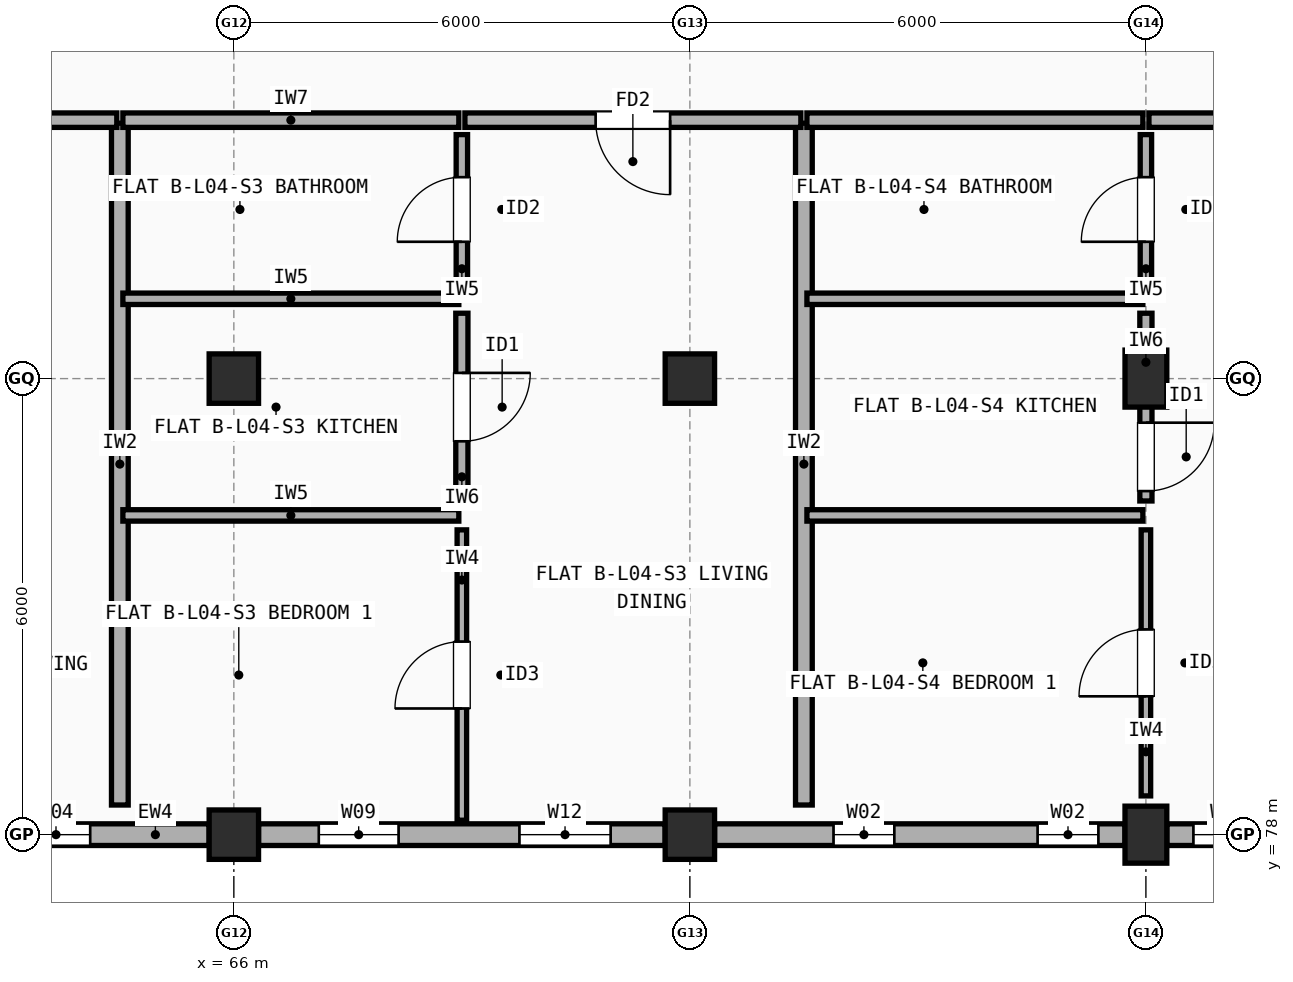
"""IFC4 building model, lengths in metres.
Left out: names, types, materials, properties, quantities, classifications, styles, units other than length and angle.
Written with IfcOpenShell. Run it as: python <this file> out.ifc"""

import sys

from ifc_helpers import new_model, si_unit, direction, frame, frame_2d, origin, origin_2d, place, context, subcontext, project, spatial, rectangle, extrude, element, fill, save


model = new_model("IFC4")
c1 = context("Model", 3, precision=1e-05, world=origin(), true_north=direction((0.0, 1.0)))
c2 = subcontext(c1, "Body", "Model", "MODEL_VIEW")
j1 = project(units=[si_unit("LENGTHUNIT", "METRE"), si_unit("PLANEANGLEUNIT", "RADIAN")], contexts=[c1])
p1 = place(None, origin())
s1 = spatial("IfcSite", under=j1, at=p1, CompositionType="ELEMENT")
p2 = place(p1, origin())
s2 = spatial("IfcBuilding", under=s1, at=p2, CompositionType="ELEMENT")
p3 = place(p2, frame((0.0, 0.0, 14.1)))
s3 = spatial("IfcBuildingStorey", under=s2, at=p3, CompositionType="ELEMENT", Elevation=14.1)
for number, where, z_axis, x_axis in (
    (1, (66.0, 78.0, 0.0), (0.0, 0.0, 1.0), (1.0, 0.0, 0.0)),
    (2, (66.0, 84.0, 0.0), (0.0, 0.0, 1.0), (1.0, 0.0, 0.0)),
    (3, (72.0, 78.0, 0.0), (0.0, 0.0, 1.0), (1.0, 0.0, 0.0)),
    (4, (72.0, 84.0, 0.0), (0.0, 0.0, 1.0), (1.0, 0.0, 0.0)),
):
    element("IfcColumn", number, at=place(p3, frame(where, z_axis=z_axis, x_axis=x_axis)), inside=s3, PredefinedType="COLUMN", context=c2, shape_type="SweptSolid", body=[
        extrude(rectangle(XDim=0.65, YDim=0.65, at=origin_2d()), origin(), (0.0, 0.0, 1.0), 2.95),
    ])
for number, where, z_axis, x_axis in (
    (5, (78.0, 78.0, 0.0), (0.0, 0.0, 1.0), (1.0, 0.0, 0.0)),
    (6, (78.0, 84.0, 0.0), (0.0, 0.0, 1.0), (1.0, 0.0, 0.0)),
):
    element("IfcColumn", number, at=place(p3, frame(where, z_axis=z_axis, x_axis=x_axis)), inside=s3, PredefinedType="COLUMN", context=c2, shape_type="SweptSolid", body=[
        extrude(rectangle(XDim=0.55, YDim=0.75, at=origin_2d()), origin(), (0.0, 0.0, 1.0), 2.95),
    ])
p4 = place(p3, frame((60.325, 78.0, 0.0), z_axis=(0.0, 0.0, 1.0), x_axis=(1.0, 0.0, 0.0)))
e7 = element("IfcWall", 7, at=p4, inside=s3, PredefinedType="STANDARD", context=c2, shape_type="SweptSolid", body=[
    extrude(rectangle(XDim=5.35, YDim=0.285, at=frame_2d((2.675, 0.0))), origin(), (0.0, 0.0, 1.0), 2.432),
])
p5 = place(p4, frame((0.35, 0.0, 0.9)))
e8 = element("IfcOpeningElement", 8, at=p5, cuts=e7, PredefinedType="OPENING", context=c2, shape_type="SweptSolid", body=[
    extrude(rectangle(XDim=0.9, YDim=1.3, at=frame_2d((0.45, 0.65))), frame((0.0, 0.152, 0.0), z_axis=(0.0, -1.0, 0.0), x_axis=(1.0, 0.0, 0.0)), (0.0, 0.0, 1.0), 0.305),
])
p6 = place(p4, frame((2.885, 0.0, 0.9)))
e9 = element("IfcOpeningElement", 9, at=p6, cuts=e7, PredefinedType="OPENING", context=c2, shape_type="SweptSolid", body=[
    extrude(rectangle(XDim=0.9, YDim=1.3, at=frame_2d((0.45, 0.65))), frame((0.0, 0.152, 0.0), z_axis=(0.0, -1.0, 0.0), x_axis=(1.0, 0.0, 0.0)), (0.0, 0.0, 1.0), 0.305),
])
p7 = place(p3, frame((66.325, 78.0, 0.0), z_axis=(0.0, 0.0, 1.0), x_axis=(1.0, 0.0, 0.0)))
e10 = element("IfcWall", 10, at=p7, inside=s3, PredefinedType="STANDARD", context=c2, shape_type="SweptSolid", body=[
    extrude(rectangle(XDim=5.35, YDim=0.285, at=frame_2d((2.675, 0.0))), origin(), (0.0, 0.0, 1.0), 2.432),
])
p8 = place(p7, frame((0.792, 0.0, 0.9)))
e11 = element("IfcOpeningElement", 11, at=p8, cuts=e10, PredefinedType="OPENING", context=c2, shape_type="SweptSolid", body=[
    extrude(rectangle(XDim=1.05, YDim=1.35, at=frame_2d((0.525, 0.675))), frame((0.0, 0.152, 0.0), z_axis=(0.0, -1.0, 0.0), x_axis=(1.0, 0.0, 0.0)), (0.0, 0.0, 1.0), 0.305),
])
p9 = place(p7, frame((3.433, 0.0, 0.9)))
e12 = element("IfcOpeningElement", 12, at=p9, cuts=e10, PredefinedType="OPENING", context=c2, shape_type="SweptSolid", body=[
    extrude(rectangle(XDim=1.2, YDim=1.35, at=frame_2d((0.6, 0.675))), frame((0.0, 0.152, 0.0), z_axis=(0.0, -1.0, 0.0), x_axis=(1.0, 0.0, 0.0)), (0.0, 0.0, 1.0), 0.305),
])
p10 = place(p3, frame((72.325, 78.0, 0.0), z_axis=(0.0, 0.0, 1.0), x_axis=(1.0, 0.0, 0.0)))
e13 = element("IfcWall", 13, at=p10, inside=s3, PredefinedType="STANDARD", context=c2, shape_type="SweptSolid", body=[
    extrude(rectangle(XDim=5.4, YDim=0.285, at=frame_2d((2.7, 0.0))), origin(), (0.0, 0.0, 1.0), 2.432),
])
p11 = place(p10, frame((1.565, 0.0, 0.9)))
e14 = element("IfcOpeningElement", 14, at=p11, cuts=e13, PredefinedType="OPENING", context=c2, shape_type="SweptSolid", body=[
    extrude(rectangle(XDim=0.8, YDim=1.2, at=frame_2d((0.4, 0.6))), frame((0.0, 0.152, 0.0), z_axis=(0.0, -1.0, 0.0), x_axis=(1.0, 0.0, 0.0)), (0.0, 0.0, 1.0), 0.305),
])
p12 = place(p10, frame((4.25, 0.0, 0.9)))
e15 = element("IfcOpeningElement", 15, at=p12, cuts=e13, PredefinedType="OPENING", context=c2, shape_type="SweptSolid", body=[
    extrude(rectangle(XDim=0.8, YDim=1.2, at=frame_2d((0.4, 0.6))), frame((0.0, 0.152, 0.0), z_axis=(0.0, -1.0, 0.0), x_axis=(1.0, 0.0, 0.0)), (0.0, 0.0, 1.0), 0.305),
])
p13 = place(p3, frame((78.275, 78.0, 0.0), z_axis=(0.0, 0.0, 1.0), x_axis=(1.0, 0.0, 0.0)))
e16 = element("IfcWall", 16, at=p13, inside=s3, PredefinedType="STANDARD", context=c2, shape_type="SweptSolid", body=[
    extrude(rectangle(XDim=5.45, YDim=0.285, at=frame_2d((2.725, 0.0))), origin(), (0.0, 0.0, 1.0), 2.432),
])
p14 = place(p13, frame((0.35, 0.0, 0.9)))
e17 = element("IfcOpeningElement", 17, at=p14, cuts=e16, PredefinedType="OPENING", context=c2, shape_type="SweptSolid", body=[
    extrude(rectangle(XDim=0.9, YDim=1.3, at=frame_2d((0.45, 0.65))), frame((0.0, 0.152, 0.0), z_axis=(0.0, -1.0, 0.0), x_axis=(1.0, 0.0, 0.0)), (0.0, 0.0, 1.0), 0.305),
])
p15 = place(p13, frame((4.2, 0.0, 0.9)))
e18 = element("IfcOpeningElement", 18, at=p15, cuts=e16, PredefinedType="OPENING", context=c2, shape_type="SweptSolid", body=[
    extrude(rectangle(XDim=0.9, YDim=1.3, at=frame_2d((0.45, 0.65))), frame((0.0, 0.152, 0.0), z_axis=(0.0, -1.0, 0.0), x_axis=(1.0, 0.0, 0.0)), (0.0, 0.0, 1.0), 0.305),
])
p16 = place(p3, frame((64.5, 78.39, 0.0), z_axis=(0.0, 0.0, 1.0), x_axis=(0.0, 1.0, 0.0)))
e19 = element("IfcWall", 19, at=p16, inside=s3, PredefinedType="SOLIDWALL", context=c2, shape_type="SweptSolid", body=[
    extrude(rectangle(XDim=8.97, YDim=0.22, at=frame_2d((4.485, 0.0))), origin(), (0.0, 0.0, 1.0), 2.432),
])
p17 = place(p3, frame((60.04, 87.4, 0.0), z_axis=(0.0, 0.0, 1.0), x_axis=(1.0, 0.0, 0.0)))
e20 = element("IfcWall", 20, at=p17, inside=s3, PredefinedType="SOLIDWALL", context=c2, shape_type="SweptSolid", body=[
    extrude(rectangle(XDim=4.42, YDim=0.19, at=frame_2d((2.21, 0.0))), origin(), (0.0, 0.0, 1.0), 2.508),
])
p18 = place(p17, frame((1.71, 0.0, 0.0)))
e21 = element("IfcOpeningElement", 21, at=p18, cuts=e20, PredefinedType="OPENING", context=c2, shape_type="SweptSolid", body=[
    extrude(rectangle(XDim=1.0, YDim=2.15, at=frame_2d((0.5, 1.075))), frame((0.0, 0.105, 0.0), z_axis=(0.0, -1.0, 0.0), x_axis=(1.0, 0.0, 0.0)), (0.0, 0.0, 1.0), 0.21),
])
p19 = place(p3, frame((73.5, 78.39, 0.0), z_axis=(0.0, 0.0, 1.0), x_axis=(0.0, 1.0, 0.0)))
e22 = element("IfcWall", 22, at=p19, inside=s3, PredefinedType="SOLIDWALL", context=c2, shape_type="SweptSolid", body=[
    extrude(rectangle(XDim=8.97, YDim=0.22, at=frame_2d((4.485, 0.0))), origin(), (0.0, 0.0, 1.0), 2.432),
])
p20 = place(p3, frame((64.54, 87.4, 0.0), z_axis=(0.0, 0.0, 1.0), x_axis=(1.0, 0.0, 0.0)))
e23 = element("IfcWall", 23, at=p20, inside=s3, PredefinedType="SOLIDWALL", context=c2, shape_type="SweptSolid", body=[
    extrude(rectangle(XDim=4.42, YDim=0.19, at=frame_2d((2.21, 0.0))), origin(), (0.0, 0.0, 1.0), 2.548),
])
p21 = place(p3, frame((69.04, 87.4, 0.0), z_axis=(0.0, 0.0, 1.0), x_axis=(1.0, 0.0, 0.0)))
e24 = element("IfcWall", 24, at=p21, inside=s3, PredefinedType="SOLIDWALL", context=c2, shape_type="SweptSolid", body=[
    extrude(rectangle(XDim=4.42, YDim=0.19, at=frame_2d((2.21, 0.0))), origin(), (0.0, 0.0, 1.0), 2.508),
])
p22 = place(p21, frame((1.72, 0.0, 0.0)))
e25 = element("IfcOpeningElement", 25, at=p22, cuts=e24, PredefinedType="OPENING", context=c2, shape_type="SweptSolid", body=[
    extrude(rectangle(XDim=0.98, YDim=2.15, at=frame_2d((0.49, 1.075))), frame((0.0, 0.105, 0.0), z_axis=(0.0, -1.0, 0.0), x_axis=(1.0, 0.0, 0.0)), (0.0, 0.0, 1.0), 0.21),
])
p23 = place(p3, frame((69.0, 78.19, 0.0), z_axis=(0.0, 0.0, 1.0), x_axis=(0.0, 1.0, 0.0)))
e26 = element("IfcWall", 26, at=p23, inside=s3, PredefinedType="PARTITIONING", context=c2, shape_type="SweptSolid", body=[
    extrude(rectangle(XDim=3.82, YDim=0.125, at=frame_2d((1.91, 0.0))), origin(), (0.0, 0.0, 1.0), 2.95),
])
p24 = place(p23, frame((1.47, 0.0, 0.0)))
e27 = element("IfcOpeningElement", 27, at=p24, cuts=e26, PredefinedType="OPENING", context=c2, shape_type="SweptSolid", body=[
    extrude(rectangle(XDim=0.88, YDim=2.1, at=frame_2d((0.44, 1.05))), frame((0.0, 0.073, 0.0), z_axis=(0.0, -1.0, 0.0), x_axis=(1.0, 0.0, 0.0)), (0.0, 0.0, 1.0), 0.145),
])
p25 = place(p3, frame((69.0, 82.39, 0.0), z_axis=(0.0, 0.0, 1.0), x_axis=(0.0, 1.0, 0.0)))
e28 = element("IfcWall", 28, at=p25, inside=s3, PredefinedType="PLUMBINGWALL", context=c2, shape_type="SweptSolid", body=[
    extrude(rectangle(XDim=2.47, YDim=0.16, at=frame_2d((1.235, 0.0))), origin(), (0.0, 0.0, 1.0), 2.432),
])
p26 = place(p25, frame((0.785, 0.0, 0.0)))
e29 = element("IfcOpeningElement", 29, at=p26, cuts=e28, PredefinedType="OPENING", context=c2, shape_type="SweptSolid", body=[
    extrude(rectangle(XDim=0.9, YDim=2.1, at=frame_2d((0.45, 1.05))), frame((0.0, 0.09, 0.0), z_axis=(0.0, -1.0, 0.0), x_axis=(1.0, 0.0, 0.0)), (0.0, 0.0, 1.0), 0.18),
])
p27 = place(p3, frame((69.0, 85.24, 0.0), z_axis=(0.0, 0.0, 1.0), x_axis=(0.0, 1.0, 0.0)))
e30 = element("IfcWall", 30, at=p27, inside=s3, PredefinedType="PARTITIONING", context=c2, shape_type="SweptSolid", body=[
    extrude(rectangle(XDim=1.97, YDim=0.15, at=frame_2d((0.985, 0.0))), origin(), (0.0, 0.0, 1.0), 2.95),
])
p28 = place(p27, frame((0.56, 0.0, 0.0)))
e31 = element("IfcOpeningElement", 31, at=p28, cuts=e30, PredefinedType="OPENING", context=c2, shape_type="SweptSolid", body=[
    extrude(rectangle(XDim=0.85, YDim=2.1, at=frame_2d((0.425, 1.05))), frame((0.0, 0.085, 0.0), z_axis=(0.0, -1.0, 0.0), x_axis=(1.0, 0.0, 0.0)), (0.0, 0.0, 1.0), 0.17),
])
p29 = place(p3, frame((64.54, 82.2, 0.0), z_axis=(0.0, 0.0, 1.0), x_axis=(1.0, 0.0, 0.0)))
e32 = element("IfcWall", 32, at=p29, inside=s3, PredefinedType="PARTITIONING", context=c2, shape_type="SweptSolid", body=[
    extrude(rectangle(XDim=4.42, YDim=0.15, at=frame_2d((2.21, 0.0))), origin(), (0.0, 0.0, 1.0), 2.458),
])
p30 = place(p3, frame((64.54, 85.05, 0.0), z_axis=(0.0, 0.0, 1.0), x_axis=(1.0, 0.0, 0.0)))
e33 = element("IfcWall", 33, at=p30, inside=s3, PredefinedType="PARTITIONING", context=c2, shape_type="SweptSolid", body=[
    extrude(rectangle(XDim=4.42, YDim=0.15, at=frame_2d((2.21, 0.0))), origin(), (0.0, 0.0, 1.0), 2.548),
])
p31 = place(p3, frame((73.54, 87.4, 0.0), z_axis=(0.0, 0.0, 1.0), x_axis=(1.0, 0.0, 0.0)))
e34 = element("IfcWall", 34, at=p31, inside=s3, PredefinedType="SOLIDWALL", context=c2, shape_type="SweptSolid", body=[
    extrude(rectangle(XDim=4.42, YDim=0.19, at=frame_2d((2.21, 0.0))), origin(), (0.0, 0.0, 1.0), 2.432),
])
p32 = place(p3, frame((78.04, 87.4, 0.0), z_axis=(0.0, 0.0, 1.0), x_axis=(1.0, 0.0, 0.0)))
e35 = element("IfcWall", 35, at=p32, inside=s3, PredefinedType="SOLIDWALL", context=c2, shape_type="SweptSolid", body=[
    extrude(rectangle(XDim=5.92, YDim=0.19, at=frame_2d((2.96, 0.0))), origin(), (0.0, 0.0, 1.0), 2.432),
])
p33 = place(p32, frame((2.435, 0.0, 0.0)))
e36 = element("IfcOpeningElement", 36, at=p33, cuts=e35, PredefinedType="OPENING", context=c2, shape_type="SweptSolid", body=[
    extrude(rectangle(XDim=1.05, YDim=2.15, at=frame_2d((0.525, 1.075))), frame((0.0, 0.105, 0.0), z_axis=(0.0, -1.0, 0.0), x_axis=(1.0, 0.0, 0.0)), (0.0, 0.0, 1.0), 0.21),
])
p34 = place(p3, frame((78.0, 78.51, 0.0), z_axis=(0.0, 0.0, 1.0), x_axis=(0.0, 1.0, 0.0)))
e37 = element("IfcWall", 37, at=p34, inside=s3, PredefinedType="PARTITIONING", context=c2, shape_type="SweptSolid", body=[
    extrude(rectangle(XDim=3.5, YDim=0.125, at=frame_2d((1.75, 0.0))), origin(), (0.0, 0.0, 1.0), 2.432),
])
p35 = place(p34, frame((1.31, 0.0, 0.0)))
e38 = element("IfcOpeningElement", 38, at=p35, cuts=e37, PredefinedType="OPENING", context=c2, shape_type="SweptSolid", body=[
    extrude(rectangle(XDim=0.88, YDim=2.1, at=frame_2d((0.44, 1.05))), frame((0.0, 0.073, 0.0), z_axis=(0.0, -1.0, 0.0), x_axis=(1.0, 0.0, 0.0)), (0.0, 0.0, 1.0), 0.145),
])
p36 = place(p3, frame((78.0, 82.39, 0.0), z_axis=(0.0, 0.0, 1.0), x_axis=(0.0, 1.0, 0.0)))
e39 = element("IfcWall", 39, at=p36, inside=s3, PredefinedType="PLUMBINGWALL", context=c2, shape_type="SweptSolid", body=[
    extrude(rectangle(XDim=2.47, YDim=0.16, at=frame_2d((1.235, 0.0))), origin(), (0.0, 0.0, 1.0), 2.432),
])
p37 = place(p36, frame((0.13, 0.0, 0.0)))
e40 = element("IfcOpeningElement", 40, at=p37, cuts=e39, PredefinedType="OPENING", context=c2, shape_type="SweptSolid", body=[
    extrude(rectangle(XDim=0.9, YDim=2.1, at=frame_2d((0.45, 1.05))), frame((0.0, 0.09, 0.0), z_axis=(0.0, -1.0, 0.0), x_axis=(1.0, 0.0, 0.0)), (0.0, 0.0, 1.0), 0.18),
])
p38 = place(p3, frame((78.0, 85.24, 0.0), z_axis=(0.0, 0.0, 1.0), x_axis=(0.0, 1.0, 0.0)))
e41 = element("IfcWall", 41, at=p38, inside=s3, PredefinedType="PARTITIONING", context=c2, shape_type="SweptSolid", body=[
    extrude(rectangle(XDim=1.97, YDim=0.15, at=frame_2d((0.985, 0.0))), origin(), (0.0, 0.0, 1.0), 2.432),
])
p39 = place(p38, frame((0.56, 0.0, 0.0)))
e42 = element("IfcOpeningElement", 42, at=p39, cuts=e41, PredefinedType="OPENING", context=c2, shape_type="SweptSolid", body=[
    extrude(rectangle(XDim=0.85, YDim=2.1, at=frame_2d((0.425, 1.05))), frame((0.0, 0.085, 0.0), z_axis=(0.0, -1.0, 0.0), x_axis=(1.0, 0.0, 0.0)), (0.0, 0.0, 1.0), 0.17),
])
for number, where, z_axis, x_axis in (
    (43, (73.54, 82.2, 0.0), (0.0, 0.0, 1.0), (1.0, 0.0, 0.0)),
    (44, (73.54, 85.05, 0.0), (0.0, 0.0, 1.0), (1.0, 0.0, 0.0)),
):
    element("IfcWall", number, at=place(p3, frame(where, z_axis=z_axis, x_axis=x_axis)), inside=s3, PredefinedType="PARTITIONING", context=c2, shape_type="SweptSolid", body=[
        extrude(rectangle(XDim=4.42, YDim=0.15, at=frame_2d((2.21, 0.0))), origin(), (0.0, 0.0, 1.0), 2.432),
    ])
p40 = place(p6, origin())
e45 = element("IfcWindow", 45, at=p40, inside=s3, PartitioningType="SINGLE_PANEL", PredefinedType="WINDOW", context=c2, shape_type="SweptSolid", body=[
    extrude(rectangle(XDim=0.9, YDim=1.3, at=frame_2d((0.45, 0.65))), frame((0.0, 0.03, 0.0), z_axis=(0.0, -1.0, 0.0), x_axis=(1.0, 0.0, 0.0)), (0.0, 0.0, 1.0), 0.06),
])
fill(e9, e45)
p41 = place(p8, origin())
e46 = element("IfcWindow", 46, at=p41, inside=s3, PartitioningType="SINGLE_PANEL", PredefinedType="WINDOW", context=c2, shape_type="SweptSolid", body=[
    extrude(rectangle(XDim=1.05, YDim=1.35, at=frame_2d((0.525, 0.675))), frame((0.0, 0.03, 0.0), z_axis=(0.0, -1.0, 0.0), x_axis=(1.0, 0.0, 0.0)), (0.0, 0.0, 1.0), 0.06),
])
fill(e11, e46)
p42 = place(p9, origin())
e47 = element("IfcWindow", 47, at=p42, inside=s3, PartitioningType="SINGLE_PANEL", PredefinedType="WINDOW", context=c2, shape_type="SweptSolid", body=[
    extrude(rectangle(XDim=1.2, YDim=1.35, at=frame_2d((0.6, 0.675))), frame((0.0, 0.03, 0.0), z_axis=(0.0, -1.0, 0.0), x_axis=(1.0, 0.0, 0.0)), (0.0, 0.0, 1.0), 0.06),
])
fill(e12, e47)
p43 = place(p11, origin())
e48 = element("IfcWindow", 48, at=p43, inside=s3, PartitioningType="SINGLE_PANEL", PredefinedType="WINDOW", context=c2, shape_type="SweptSolid", body=[
    extrude(rectangle(XDim=0.8, YDim=1.2, at=frame_2d((0.4, 0.6))), frame((0.0, 0.03, 0.0), z_axis=(0.0, -1.0, 0.0), x_axis=(1.0, 0.0, 0.0)), (0.0, 0.0, 1.0), 0.06),
])
fill(e14, e48)
p44 = place(p12, origin())
e49 = element("IfcWindow", 49, at=p44, inside=s3, PartitioningType="SINGLE_PANEL", PredefinedType="WINDOW", context=c2, shape_type="SweptSolid", body=[
    extrude(rectangle(XDim=0.8, YDim=1.2, at=frame_2d((0.4, 0.6))), frame((0.0, 0.03, 0.0), z_axis=(0.0, -1.0, 0.0), x_axis=(1.0, 0.0, 0.0)), (0.0, 0.0, 1.0), 0.06),
])
fill(e15, e49)
p45 = place(p14, origin())
e50 = element("IfcWindow", 50, at=p45, inside=s3, PartitioningType="SINGLE_PANEL", PredefinedType="WINDOW", context=c2, shape_type="SweptSolid", body=[
    extrude(rectangle(XDim=0.9, YDim=1.3, at=frame_2d((0.45, 0.65))), frame((0.0, 0.03, 0.0), z_axis=(0.0, -1.0, 0.0), x_axis=(1.0, 0.0, 0.0)), (0.0, 0.0, 1.0), 0.06),
])
fill(e17, e50)
p46 = place(p22, origin())
e51 = element("IfcDoor", 51, at=p46, inside=s3, OperationType="SINGLE_SWING_RIGHT", PredefinedType="DOOR", context=c2, shape_type="SweptSolid", body=[
    extrude(rectangle(XDim=0.98, YDim=2.15, at=frame_2d((0.49, 1.075))), frame((0.0, 0.025, 0.0), z_axis=(0.0, -1.0, 0.0), x_axis=(1.0, 0.0, 0.0)), (0.0, 0.0, 1.0), 0.05),
])
fill(e25, e51)
p47 = place(p24, origin())
e52 = element("IfcDoor", 52, at=p47, inside=s3, OperationType="SINGLE_SWING_LEFT", PredefinedType="DOOR", context=c2, shape_type="SweptSolid", body=[
    extrude(rectangle(XDim=0.88, YDim=2.1, at=frame_2d((0.44, 1.05))), frame((0.0, 0.025, 0.0), z_axis=(0.0, -1.0, 0.0), x_axis=(1.0, 0.0, 0.0)), (0.0, 0.0, 1.0), 0.05),
])
fill(e27, e52)
p48 = place(p26, origin())
e53 = element("IfcDoor", 53, at=p48, inside=s3, OperationType="SINGLE_SWING_RIGHT", PredefinedType="DOOR", context=c2, shape_type="SweptSolid", body=[
    extrude(rectangle(XDim=0.9, YDim=2.1, at=frame_2d((0.45, 1.05))), frame((0.0, 0.025, 0.0), z_axis=(0.0, -1.0, 0.0), x_axis=(1.0, 0.0, 0.0)), (0.0, 0.0, 1.0), 0.05),
])
fill(e29, e53)
p49 = place(p28, origin())
e54 = element("IfcDoor", 54, at=p49, inside=s3, OperationType="SINGLE_SWING_LEFT", PredefinedType="DOOR", context=c2, shape_type="SweptSolid", body=[
    extrude(rectangle(XDim=0.85, YDim=2.1, at=frame_2d((0.425, 1.05))), frame((0.0, 0.025, 0.0), z_axis=(0.0, -1.0, 0.0), x_axis=(1.0, 0.0, 0.0)), (0.0, 0.0, 1.0), 0.05),
])
fill(e31, e54)
p50 = place(p35, origin())
e55 = element("IfcDoor", 55, at=p50, inside=s3, OperationType="SINGLE_SWING_LEFT", PredefinedType="DOOR", context=c2, shape_type="SweptSolid", body=[
    extrude(rectangle(XDim=0.88, YDim=2.1, at=frame_2d((0.44, 1.05))), frame((0.0, 0.025, 0.0), z_axis=(0.0, -1.0, 0.0), x_axis=(1.0, 0.0, 0.0)), (0.0, 0.0, 1.0), 0.05),
])
fill(e38, e55)
p51 = place(p37, origin())
e56 = element("IfcDoor", 56, at=p51, inside=s3, OperationType="SINGLE_SWING_RIGHT", PredefinedType="DOOR", context=c2, shape_type="SweptSolid", body=[
    extrude(rectangle(XDim=0.9, YDim=2.1, at=frame_2d((0.45, 1.05))), frame((0.0, 0.025, 0.0), z_axis=(0.0, -1.0, 0.0), x_axis=(1.0, 0.0, 0.0)), (0.0, 0.0, 1.0), 0.05),
])
fill(e40, e56)
p52 = place(p39, origin())
e57 = element("IfcDoor", 57, at=p52, inside=s3, OperationType="SINGLE_SWING_LEFT", PredefinedType="DOOR", context=c2, shape_type="SweptSolid", body=[
    extrude(rectangle(XDim=0.85, YDim=2.1, at=frame_2d((0.425, 1.05))), frame((0.0, 0.025, 0.0), z_axis=(0.0, -1.0, 0.0), x_axis=(1.0, 0.0, 0.0)), (0.0, 0.0, 1.0), 0.05),
])
fill(e42, e57)
save(model, sys.argv[1])
